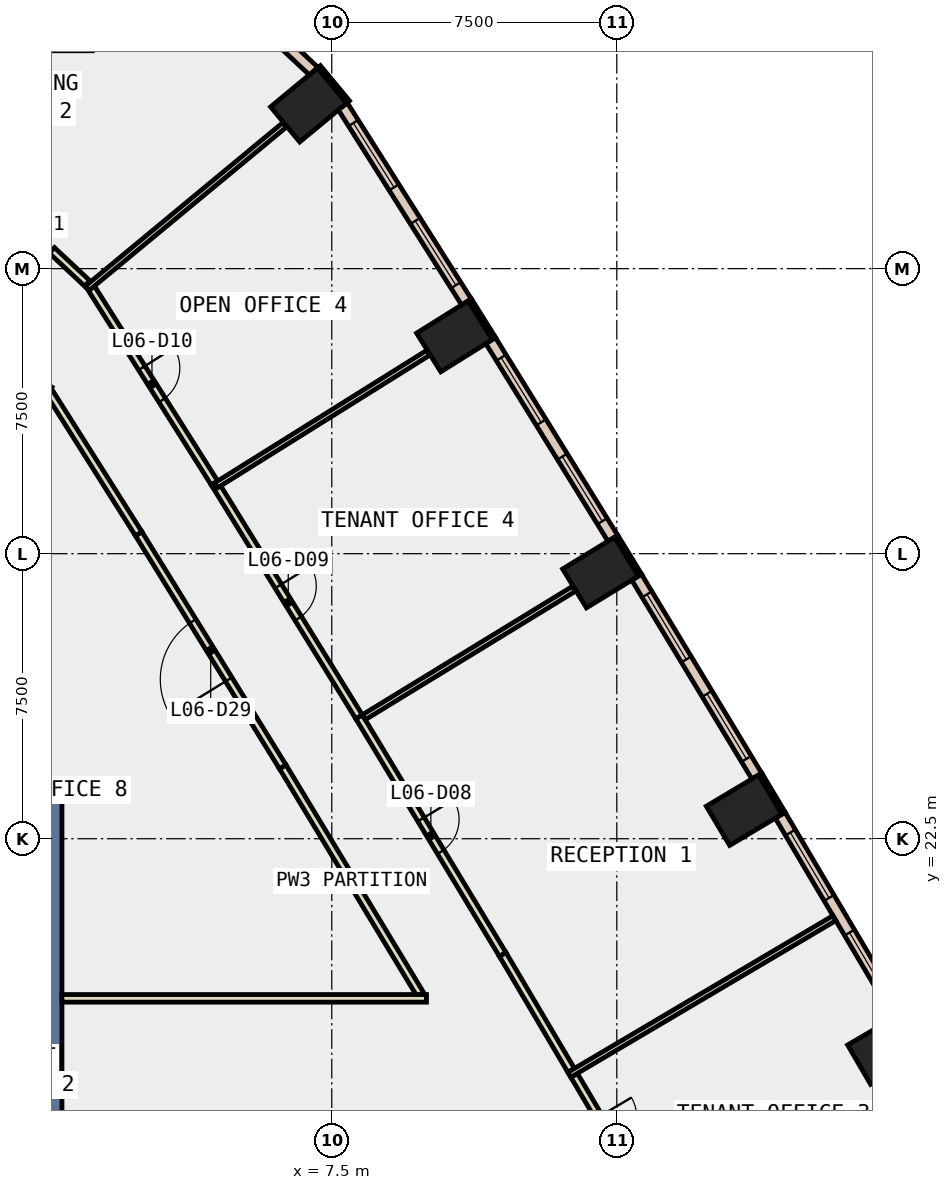
"""IFC4 building model, lengths in metres.
Left out: names, types, materials, properties, quantities, classifications, styles, units other than length and angle.
Written with IfcOpenShell. Run it as: python <this file> out.ifc"""

import sys

from ifc_helpers import new_model, si_unit, direction, frame, frame_2d, origin, origin_2d, place, context, subcontext, project, spatial, rectangle, extrude, element, fill, save


model = new_model("IFC4")
c1 = context("Model", 3, precision=1e-05, world=origin(), true_north=direction((0.0, 1.0)))
c2 = subcontext(c1, "Body", "Model", "MODEL_VIEW")
j1 = project(units=[si_unit("LENGTHUNIT", "METRE"), si_unit("PLANEANGLEUNIT", "RADIAN")], contexts=[c1])
p1 = place(None, origin())
s1 = spatial("IfcSite", under=j1, at=p1, CompositionType="ELEMENT")
p2 = place(p1, origin())
s2 = spatial("IfcBuilding", under=s1, at=p2, CompositionType="ELEMENT")
p3 = place(p2, frame((0.0, 0.0, 35.0)))
s3 = spatial("IfcBuildingStorey", under=s2, at=p3, CompositionType="ELEMENT", Elevation=35.0)
for number, where, z_axis, x_axis in (
    (1, (22.068, 16.959, -0.6), (0.0, 0.0, 1.0), (-0.504, 0.864, 0.0)),
    (2, (18.35, 23.25, -0.6), (0.0, 0.0, 1.0), (-0.513, 0.858, 0.0)),
    (3, (14.571, 29.504, -0.6), (0.0, 0.0, 1.0), (-0.522, 0.853, 0.0)),
    (4, (10.729, 35.719, -0.6), (0.0, 0.0, 1.0), (-0.53, 0.848, 0.0)),
    (5, (6.89, 41.806, -0.6), (0.0, 0.0, 1.0), (-0.638, 0.77, 0.0)),
):
    element("IfcColumn", number, at=place(p3, frame(where, z_axis=z_axis, x_axis=x_axis)), inside=s3, PredefinedType="COLUMN", context=c2, shape_type="SweptSolid", body=[
        extrude(rectangle(XDim=1.2, YDim=1.6, at=origin_2d()), origin(), (0.0, 0.0, 1.0), 4.4),
    ])
p4 = place(p3, frame((0.0, 14.5, -0.6), z_axis=(0.0, 0.0, 1.0), x_axis=(0.0, 1.0, 0.0)))
e6 = element("IfcWall", 6, at=p4, inside=s3, PredefinedType="SHEAR", context=c2, shape_type="SweptSolid", body=[
    extrude(rectangle(XDim=9.0, YDim=0.8, at=frame_2d((4.5, 0.0))), origin(), (0.0, 0.0, 1.0), 4.4),
])
for number, where, z_axis, x_axis in (
    (7, (19.388, 23.171, 0.0), (0.0, 0.0, 1.0), (-0.513, 0.858, 0.0)),
    (8, (15.609, 29.435, 0.0), (0.0, 0.0, 1.0), (-0.522, 0.853, 0.0)),
):
    element("IfcWall", number, at=place(p3, frame(where, z_axis=z_axis, x_axis=x_axis)), inside=s3, PredefinedType="STANDARD", context=c2, shape_type="SweptSolid", body=[
        extrude(rectangle(XDim=1.2, YDim=0.1, at=frame_2d((0.6, 0.0))), origin(), (0.0, 0.0, 1.0), 3.8),
    ])
for number, where, z_axis, x_axis in (
    (9, (11.768, 35.661, 0.0), (0.0, 0.0, 1.0), (-0.53, 0.848, 0.0)),
    (10, (7.927, 41.886, 0.0), (0.0, 0.0, 1.0), (-0.638, 0.77, 0.0)),
):
    element("IfcWall", number, at=place(p3, frame(where, z_axis=z_axis, x_axis=x_axis)), inside=s3, PredefinedType="STANDARD", context=c2, shape_type="SweptSolid", body=[
        extrude(rectangle(XDim=1.199, YDim=0.1, at=frame_2d((0.6, 0.0))), origin(), (0.0, 0.0, 1.0), 3.8),
    ])
p5 = place(p3, frame((22.411, 17.853, 0.0), z_axis=(0.0, 0.0, 1.0), x_axis=(-0.508749483145, 0.860914608658, 0.0)))
e11 = element("IfcWall", 11, at=p5, inside=s3, PredefinedType="STANDARD", context=c2, shape_type="SweptSolid", body=[
    extrude(rectangle(XDim=6.117, YDim=0.3, at=frame_2d((3.058, 0.0))), origin(), (0.0, 0.0, 1.0), 3.8),
])
p6 = place(p5, frame((0.529, 0.0, 0.9)))
e12 = element("IfcOpeningElement", 12, at=p6, cuts=e11, PredefinedType="OPENING", context=c2, shape_type="SweptSolid", body=[
    extrude(rectangle(XDim=2.0, YDim=2.6, at=frame_2d((1.0, 1.3))), frame((0.0, 0.16, 0.0), z_axis=(0.0, -1.0, 0.0), x_axis=(1.0, 0.0, 0.0)), (0.0, 0.0, 1.0), 0.32),
])
p7 = place(p5, frame((3.588, 0.0, 0.9)))
e13 = element("IfcOpeningElement", 13, at=p7, cuts=e11, PredefinedType="OPENING", context=c2, shape_type="SweptSolid", body=[
    extrude(rectangle(XDim=2.0, YDim=2.6, at=frame_2d((1.0, 1.3))), frame((0.0, 0.16, 0.0), z_axis=(0.0, -1.0, 0.0), x_axis=(1.0, 0.0, 0.0)), (0.0, 0.0, 1.0), 0.32),
])
p8 = place(p3, frame((18.684, 24.148, 0.0), z_axis=(0.0, 0.0, 1.0), x_axis=(-0.517211293816, 0.855857743757, 0.0)))
e14 = element("IfcWall", 14, at=p8, inside=s3, PredefinedType="STANDARD", context=c2, shape_type="SweptSolid", body=[
    extrude(rectangle(XDim=6.116, YDim=0.3, at=frame_2d((3.058, 0.0))), origin(), (0.0, 0.0, 1.0), 3.8),
])
p9 = place(p8, frame((0.529, 0.0, 0.9)))
e15 = element("IfcOpeningElement", 15, at=p9, cuts=e14, PredefinedType="OPENING", context=c2, shape_type="SweptSolid", body=[
    extrude(rectangle(XDim=2.0, YDim=2.6, at=frame_2d((1.0, 1.3))), frame((0.0, 0.16, 0.0), z_axis=(0.0, -1.0, 0.0), x_axis=(1.0, 0.0, 0.0)), (0.0, 0.0, 1.0), 0.32),
])
p10 = place(p8, frame((3.587, 0.0, 0.9)))
e16 = element("IfcOpeningElement", 16, at=p10, cuts=e14, PredefinedType="OPENING", context=c2, shape_type="SweptSolid", body=[
    extrude(rectangle(XDim=2.0, YDim=2.6, at=frame_2d((1.0, 1.3))), frame((0.0, 0.16, 0.0), z_axis=(0.0, -1.0, 0.0), x_axis=(1.0, 0.0, 0.0)), (0.0, 0.0, 1.0), 0.32),
])
p11 = place(p3, frame((14.896, 30.404, 0.0), z_axis=(0.0, 0.0, 1.0), x_axis=(-0.525791118496, 0.850613719447, 0.0)))
e17 = element("IfcWall", 17, at=p11, inside=s3, PredefinedType="STANDARD", context=c2, shape_type="SweptSolid", body=[
    extrude(rectangle(XDim=6.117, YDim=0.3, at=frame_2d((3.058, 0.0))), origin(), (0.0, 0.0, 1.0), 3.8),
])
p12 = place(p11, frame((0.529, 0.0, 0.9)))
e18 = element("IfcOpeningElement", 18, at=p12, cuts=e17, PredefinedType="OPENING", context=c2, shape_type="SweptSolid", body=[
    extrude(rectangle(XDim=2.0, YDim=2.6, at=frame_2d((1.0, 1.3))), frame((0.0, 0.16, 0.0), z_axis=(0.0, -1.0, 0.0), x_axis=(1.0, 0.0, 0.0)), (0.0, 0.0, 1.0), 0.32),
])
p13 = place(p11, frame((3.588, 0.0, 0.9)))
e19 = element("IfcOpeningElement", 19, at=p13, cuts=e17, PredefinedType="OPENING", context=c2, shape_type="SweptSolid", body=[
    extrude(rectangle(XDim=2.0, YDim=2.6, at=frame_2d((1.0, 1.3))), frame((0.0, 0.16, 0.0), z_axis=(0.0, -1.0, 0.0), x_axis=(1.0, 0.0, 0.0)), (0.0, 0.0, 1.0), 0.32),
])
p14 = place(p3, frame((11.045, 36.623, 0.0), z_axis=(0.0, 0.0, 1.0), x_axis=(-0.53437888117, 0.845245059944, 0.0)))
e20 = element("IfcWall", 20, at=p14, inside=s3, PredefinedType="STANDARD", context=c2, shape_type="SweptSolid", body=[
    extrude(rectangle(XDim=6.093, YDim=0.3, at=frame_2d((3.046, 0.0))), origin(), (0.0, 0.0, 1.0), 3.8),
])
p15 = place(p14, frame((0.523, 0.0, 0.9)))
e21 = element("IfcOpeningElement", 21, at=p15, cuts=e20, PredefinedType="OPENING", context=c2, shape_type="SweptSolid", body=[
    extrude(rectangle(XDim=2.0, YDim=2.6, at=frame_2d((1.0, 1.3))), frame((0.0, 0.16, 0.0), z_axis=(0.0, -1.0, 0.0), x_axis=(1.0, 0.0, 0.0)), (0.0, 0.0, 1.0), 0.32),
])
p16 = place(p14, frame((3.57, 0.0, 0.9)))
e22 = element("IfcOpeningElement", 22, at=p16, cuts=e20, PredefinedType="OPENING", context=c2, shape_type="SweptSolid", body=[
    extrude(rectangle(XDim=2.0, YDim=2.6, at=frame_2d((1.0, 1.3))), frame((0.0, 0.16, 0.0), z_axis=(0.0, -1.0, 0.0), x_axis=(1.0, 0.0, 0.0)), (0.0, 0.0, 1.0), 0.32),
])
p17 = place(p3, frame((7.025, 42.696, 0.0), z_axis=(0.0, 0.0, 1.0), x_axis=(-0.730600984463, 0.682804658377, 0.0)))
e23 = element("IfcWall", 23, at=p17, inside=s3, PredefinedType="STANDARD", context=c2, shape_type="SweptSolid", body=[
    extrude(rectangle(XDim=3.182, YDim=0.3, at=frame_2d((1.591, 0.0))), origin(), (0.0, 0.0, 1.0), 3.8),
])
p18 = place(p17, frame((0.891, 0.0, 0.9)))
e24 = element("IfcOpeningElement", 24, at=p18, cuts=e23, PredefinedType="OPENING", context=c2, shape_type="SweptSolid", body=[
    extrude(rectangle(XDim=1.4, YDim=2.6, at=frame_2d((0.7, 1.3))), frame((0.0, 0.16, 0.0), z_axis=(0.0, -1.0, 0.0), x_axis=(1.0, 0.0, 0.0)), (0.0, 0.0, 1.0), 0.32),
])
p19 = place(p3, frame((9.84, 18.386, 0.0), z_axis=(0.0, 0.0, 1.0), x_axis=(-0.51736780002, 0.85576314451, 0.0)))
e25 = element("IfcWall", 25, at=p19, inside=s3, PredefinedType="PARTITIONING", context=c2, shape_type="SweptSolid", body=[
    extrude(rectangle(XDim=7.018, YDim=0.2, at=frame_2d((3.509, 0.0))), origin(), (0.0, 0.0, 1.0), 3.8),
])
p20 = place(p3, frame((6.209, 24.392, 0.0), z_axis=(0.0, 0.0, 1.0), x_axis=(-0.525766851327, 0.850628719269, 0.0)))
e26 = element("IfcWall", 26, at=p20, inside=s3, PredefinedType="PARTITIONING", context=c2, shape_type="SweptSolid", body=[
    extrude(rectangle(XDim=7.208, YDim=0.2, at=frame_2d((3.604, 0.0))), origin(), (0.0, 0.0, 1.0), 3.8),
])
p21 = place(p20, frame((2.704, 0.0, 0.0)))
e27 = element("IfcOpeningElement", 27, at=p21, cuts=e26, PredefinedType="OPENING", context=c2, shape_type="SweptSolid", body=[
    extrude(rectangle(XDim=1.8, YDim=2.1, at=frame_2d((0.9, 1.05))), frame((0.0, 0.11, 0.0), z_axis=(0.0, -1.0, 0.0), x_axis=(1.0, 0.0, 0.0)), (0.0, 0.0, 1.0), 0.22),
])
p22 = place(p3, frame((2.419, 30.524, 0.0), z_axis=(0.0, 0.0, 1.0), x_axis=(-0.534393348019, 0.845235913573, 0.0)))
e28 = element("IfcWall", 28, at=p22, inside=s3, PredefinedType="PARTITIONING", context=c2, shape_type="SweptSolid", body=[
    extrude(rectangle(XDim=4.427, YDim=0.2, at=frame_2d((2.214, 0.0))), origin(), (0.0, 0.0, 1.0), 3.8),
])
p23 = place(p3, frame((0.053, 34.435, 0.0), z_axis=(0.0, 0.0, 1.0), x_axis=(-0.534260976666, -0.845319589748, 0.0)))
e29 = element("IfcWall", 29, at=p23, inside=s3, PredefinedType="PARTITIONING", context=c2, shape_type="SweptSolid", body=[
    extrude(rectangle(XDim=4.627, YDim=0.2, at=frame_2d((2.313, 0.0))), origin(), (0.0, 0.0, 1.0), 3.8),
])
p24 = place(p3, frame((13.877, 16.275, 0.0), z_axis=(0.0, 0.0, 1.0), x_axis=(0.508613166028, -0.860995149431, 0.0)))
e30 = element("IfcWall", 30, at=p24, inside=s3, PredefinedType="PARTITIONING", context=c2, shape_type="SweptSolid", body=[
    extrude(rectangle(XDim=3.541, YDim=0.2, at=frame_2d((1.771, 0.0))), origin(), (0.0, 0.0, 1.0), 3.8),
])
p25 = place(p24, frame((1.271, 0.0, 0.0)))
e31 = element("IfcOpeningElement", 31, at=p25, cuts=e30, PredefinedType="OPENING", context=c2, shape_type="SweptSolid", body=[
    extrude(rectangle(XDim=1.0, YDim=2.1, at=frame_2d((0.5, 1.05))), frame((0.0, 0.11, 0.0), z_axis=(0.0, -1.0, 0.0), x_axis=(1.0, 0.0, 0.0)), (0.0, 0.0, 1.0), 0.22),
])
p26 = place(p3, frame((8.218, 25.708, 0.0), z_axis=(0.0, 0.0, 1.0), x_axis=(0.517278800461, -0.855816944559, 0.0)))
e32 = element("IfcWall", 32, at=p26, inside=s3, PredefinedType="PARTITIONING", context=c2, shape_type="SweptSolid", body=[
    extrude(rectangle(XDim=7.308, YDim=0.2, at=frame_2d((3.654, 0.0))), origin(), (0.0, 0.0, 1.0), 3.8),
])
p27 = place(p26, frame((3.154, 0.0, 0.0)))
e33 = element("IfcOpeningElement", 33, at=p27, cuts=e32, PredefinedType="OPENING", context=c2, shape_type="SweptSolid", body=[
    extrude(rectangle(XDim=1.0, YDim=2.1, at=frame_2d((0.5, 1.05))), frame((0.0, 0.11, 0.0), z_axis=(0.0, -1.0, 0.0), x_axis=(1.0, 0.0, 0.0)), (0.0, 0.0, 1.0), 0.22),
])
p28 = place(p3, frame((11.998, 19.454, 0.0), z_axis=(0.0, 0.0, 1.0), x_axis=(0.508666621784, -0.860963569428, 0.0)))
e34 = element("IfcWall", 34, at=p28, inside=s3, PredefinedType="PARTITIONING", context=c2, shape_type="SweptSolid", body=[
    extrude(rectangle(XDim=3.542, YDim=0.2, at=frame_2d((1.771, 0.0))), origin(), (0.0, 0.0, 1.0), 3.8),
])
p29 = place(p3, frame((4.414, 31.86, 0.0), z_axis=(0.0, 0.0, 1.0), x_axis=(0.525906013367, -0.850542688584, 0.0)))
e35 = element("IfcWall", 35, at=p29, inside=s3, PredefinedType="PARTITIONING", context=c2, shape_type="SweptSolid", body=[
    extrude(rectangle(XDim=7.233, YDim=0.2, at=frame_2d((3.617, 0.0))), origin(), (0.0, 0.0, 1.0), 3.8),
])
p30 = place(p29, frame((3.191, 0.0, 0.0)))
e36 = element("IfcOpeningElement", 36, at=p30, cuts=e35, PredefinedType="OPENING", context=c2, shape_type="SweptSolid", body=[
    extrude(rectangle(XDim=1.0, YDim=2.1, at=frame_2d((0.5, 1.05))), frame((0.0, 0.11, 0.0), z_axis=(0.0, -1.0, 0.0), x_axis=(1.0, 0.0, 0.0)), (0.0, 0.0, 1.0), 0.22),
])
p31 = place(p3, frame((1.123, 37.065, 0.0), z_axis=(0.0, 0.0, 1.0), x_axis=(0.534428477307, -0.845213702352, 0.0)))
e37 = element("IfcWall", 37, at=p31, inside=s3, PredefinedType="PARTITIONING", context=c2, shape_type="SweptSolid", body=[
    extrude(rectangle(XDim=6.158, YDim=0.2, at=frame_2d((3.079, 0.0))), origin(), (0.0, 0.0, 1.0), 3.8),
])
p32 = place(p31, frame((2.579, 0.0, 0.0)))
e38 = element("IfcOpeningElement", 38, at=p32, cuts=e37, PredefinedType="OPENING", context=c2, shape_type="SweptSolid", body=[
    extrude(rectangle(XDim=1.0, YDim=2.1, at=frame_2d((0.5, 1.05))), frame((0.0, 0.11, 0.0), z_axis=(0.0, -1.0, 0.0), x_axis=(1.0, 0.0, 0.0)), (0.0, 0.0, 1.0), 0.22),
])
p33 = place(p3, frame((0.135, 37.981, 0.0), z_axis=(0.0, 0.0, 1.0), x_axis=(0.730320833825, -0.683104296342, 0.0)))
e39 = element("IfcWall", 39, at=p33, inside=s3, PredefinedType="PARTITIONING", context=c2, shape_type="SweptSolid", body=[
    extrude(rectangle(XDim=1.272, YDim=0.2, at=frame_2d((0.636, 0.0))), origin(), (0.0, 0.0, 1.0), 3.8),
])
p34 = place(p3, frame((13.752, 16.289, 0.0), z_axis=(0.0, 0.0, 1.0), x_axis=(0.86093852802, 0.508709004216, 0.0)))
e40 = element("IfcWall", 40, at=p34, inside=s3, PredefinedType="PARTITIONING", context=c2, shape_type="SweptSolid", body=[
    extrude(rectangle(XDim=8.101, YDim=0.15, at=frame_2d((4.05, 0.0))), origin(), (0.0, 0.0, 1.0), 3.8),
])
p35 = place(p3, frame((8.342, 25.696, 0.0), z_axis=(0.0, 0.0, 1.0), x_axis=(0.853252966465, 0.521497243731, 0.0)))
e41 = element("IfcWall", 41, at=p35, inside=s3, PredefinedType="PARTITIONING", context=c2, shape_type="SweptSolid", body=[
    extrude(rectangle(XDim=6.481, YDim=0.15, at=frame_2d((3.241, 0.0))), origin(), (0.0, 0.0, 1.0), 3.8),
])
p36 = place(p3, frame((4.454, 31.796, 0.0), z_axis=(0.0, 0.0, 1.0), x_axis=(0.847954529694, 0.530068972467, 0.0)))
e42 = element("IfcWall", 42, at=p36, inside=s3, PredefinedType="PARTITIONING", context=c2, shape_type="SweptSolid", body=[
    extrude(rectangle(XDim=6.58, YDim=0.15, at=frame_2d((3.29, 0.0))), origin(), (0.0, 0.0, 1.0), 3.8),
])
p37 = place(p3, frame((1.06, 36.98, 0.0), z_axis=(0.0, 0.0, 1.0), x_axis=(0.770307911054, 0.6376721118, 0.0)))
e43 = element("IfcWall", 43, at=p37, inside=s3, PredefinedType="PARTITIONING", context=c2, shape_type="SweptSolid", body=[
    extrude(rectangle(XDim=6.748, YDim=0.15, at=frame_2d((3.374, 0.0))), origin(), (0.0, 0.0, 1.0), 3.8),
])
p38 = place(p3, frame((0.4, 18.3, 0.0), z_axis=(0.0, 0.0, 1.0), x_axis=(1.0, 0.0, 0.0)))
e44 = element("IfcWall", 44, at=p38, inside=s3, PredefinedType="PARTITIONING", context=c2, shape_type="SweptSolid", body=[
    extrude(rectangle(XDim=9.592, YDim=0.2, at=frame_2d((4.796, 0.0))), origin(), (0.0, 0.0, 1.0), 3.8),
])
p39 = place(p6, origin())
e45 = element("IfcWindow", 45, at=p39, inside=s3, PartitioningType="SINGLE_PANEL", PredefinedType="WINDOW", context=c2, shape_type="SweptSolid", body=[
    extrude(rectangle(XDim=2.0, YDim=2.6, at=frame_2d((1.0, 1.3))), frame((0.0, 0.03, 0.0), z_axis=(0.0, -1.0, 0.0), x_axis=(1.0, 0.0, 0.0)), (0.0, 0.0, 1.0), 0.06),
])
fill(e12, e45)
p40 = place(p7, origin())
e46 = element("IfcWindow", 46, at=p40, inside=s3, PartitioningType="SINGLE_PANEL", PredefinedType="WINDOW", context=c2, shape_type="SweptSolid", body=[
    extrude(rectangle(XDim=2.0, YDim=2.6, at=frame_2d((1.0, 1.3))), frame((0.0, 0.03, 0.0), z_axis=(0.0, -1.0, 0.0), x_axis=(1.0, 0.0, 0.0)), (0.0, 0.0, 1.0), 0.06),
])
fill(e13, e46)
p41 = place(p9, origin())
e47 = element("IfcWindow", 47, at=p41, inside=s3, PartitioningType="SINGLE_PANEL", PredefinedType="WINDOW", context=c2, shape_type="SweptSolid", body=[
    extrude(rectangle(XDim=2.0, YDim=2.6, at=frame_2d((1.0, 1.3))), frame((0.0, 0.03, 0.0), z_axis=(0.0, -1.0, 0.0), x_axis=(1.0, 0.0, 0.0)), (0.0, 0.0, 1.0), 0.06),
])
fill(e15, e47)
p42 = place(p10, origin())
e48 = element("IfcWindow", 48, at=p42, inside=s3, PartitioningType="SINGLE_PANEL", PredefinedType="WINDOW", context=c2, shape_type="SweptSolid", body=[
    extrude(rectangle(XDim=2.0, YDim=2.6, at=frame_2d((1.0, 1.3))), frame((0.0, 0.03, 0.0), z_axis=(0.0, -1.0, 0.0), x_axis=(1.0, 0.0, 0.0)), (0.0, 0.0, 1.0), 0.06),
])
fill(e16, e48)
p43 = place(p12, origin())
e49 = element("IfcWindow", 49, at=p43, inside=s3, PartitioningType="SINGLE_PANEL", PredefinedType="WINDOW", context=c2, shape_type="SweptSolid", body=[
    extrude(rectangle(XDim=2.0, YDim=2.6, at=frame_2d((1.0, 1.3))), frame((0.0, 0.03, 0.0), z_axis=(0.0, -1.0, 0.0), x_axis=(1.0, 0.0, 0.0)), (0.0, 0.0, 1.0), 0.06),
])
fill(e18, e49)
p44 = place(p13, origin())
e50 = element("IfcWindow", 50, at=p44, inside=s3, PartitioningType="SINGLE_PANEL", PredefinedType="WINDOW", context=c2, shape_type="SweptSolid", body=[
    extrude(rectangle(XDim=2.0, YDim=2.6, at=frame_2d((1.0, 1.3))), frame((0.0, 0.03, 0.0), z_axis=(0.0, -1.0, 0.0), x_axis=(1.0, 0.0, 0.0)), (0.0, 0.0, 1.0), 0.06),
])
fill(e19, e50)
p45 = place(p15, origin())
e51 = element("IfcWindow", 51, at=p45, inside=s3, PartitioningType="SINGLE_PANEL", PredefinedType="WINDOW", context=c2, shape_type="SweptSolid", body=[
    extrude(rectangle(XDim=2.0, YDim=2.6, at=frame_2d((1.0, 1.3))), frame((0.0, 0.03, 0.0), z_axis=(0.0, -1.0, 0.0), x_axis=(1.0, 0.0, 0.0)), (0.0, 0.0, 1.0), 0.06),
])
fill(e21, e51)
p46 = place(p16, origin())
e52 = element("IfcWindow", 52, at=p46, inside=s3, PartitioningType="SINGLE_PANEL", PredefinedType="WINDOW", context=c2, shape_type="SweptSolid", body=[
    extrude(rectangle(XDim=2.0, YDim=2.6, at=frame_2d((1.0, 1.3))), frame((0.0, 0.03, 0.0), z_axis=(0.0, -1.0, 0.0), x_axis=(1.0, 0.0, 0.0)), (0.0, 0.0, 1.0), 0.06),
])
fill(e22, e52)
p47 = place(p27, origin())
e53 = element("IfcDoor", 53, at=p47, inside=s3, OperationType="SINGLE_SWING_LEFT", PredefinedType="DOOR", context=c2, shape_type="SweptSolid", body=[
    extrude(rectangle(XDim=1.0, YDim=2.1, at=frame_2d((0.5, 1.05))), frame((0.0, 0.025, 0.0), z_axis=(0.0, -1.0, 0.0), x_axis=(1.0, 0.0, 0.0)), (0.0, 0.0, 1.0), 0.05),
])
fill(e33, e53)
p48 = place(p30, origin())
e54 = element("IfcDoor", 54, at=p48, inside=s3, OperationType="SINGLE_SWING_LEFT", PredefinedType="DOOR", context=c2, shape_type="SweptSolid", body=[
    extrude(rectangle(XDim=1.0, YDim=2.1, at=frame_2d((0.5, 1.05))), frame((0.0, 0.025, 0.0), z_axis=(0.0, -1.0, 0.0), x_axis=(1.0, 0.0, 0.0)), (0.0, 0.0, 1.0), 0.05),
])
fill(e36, e54)
p49 = place(p32, origin())
e55 = element("IfcDoor", 55, at=p49, inside=s3, OperationType="SINGLE_SWING_LEFT", PredefinedType="DOOR", context=c2, shape_type="SweptSolid", body=[
    extrude(rectangle(XDim=1.0, YDim=2.1, at=frame_2d((0.5, 1.05))), frame((0.0, 0.025, 0.0), z_axis=(0.0, -1.0, 0.0), x_axis=(1.0, 0.0, 0.0)), (0.0, 0.0, 1.0), 0.05),
])
fill(e38, e55)
p50 = place(p21, origin())
e56 = element("IfcDoor", 56, at=p50, inside=s3, OperationType="DOUBLE_DOOR_SINGLE_SWING", PredefinedType="DOOR", context=c2, shape_type="SweptSolid", body=[
    extrude(rectangle(XDim=1.8, YDim=2.1, at=frame_2d((0.9, 1.05))), frame((0.0, 0.025, 0.0), z_axis=(0.0, -1.0, 0.0), x_axis=(1.0, 0.0, 0.0)), (0.0, 0.0, 1.0), 0.05),
])
fill(e27, e56)
save(model, sys.argv[1])
